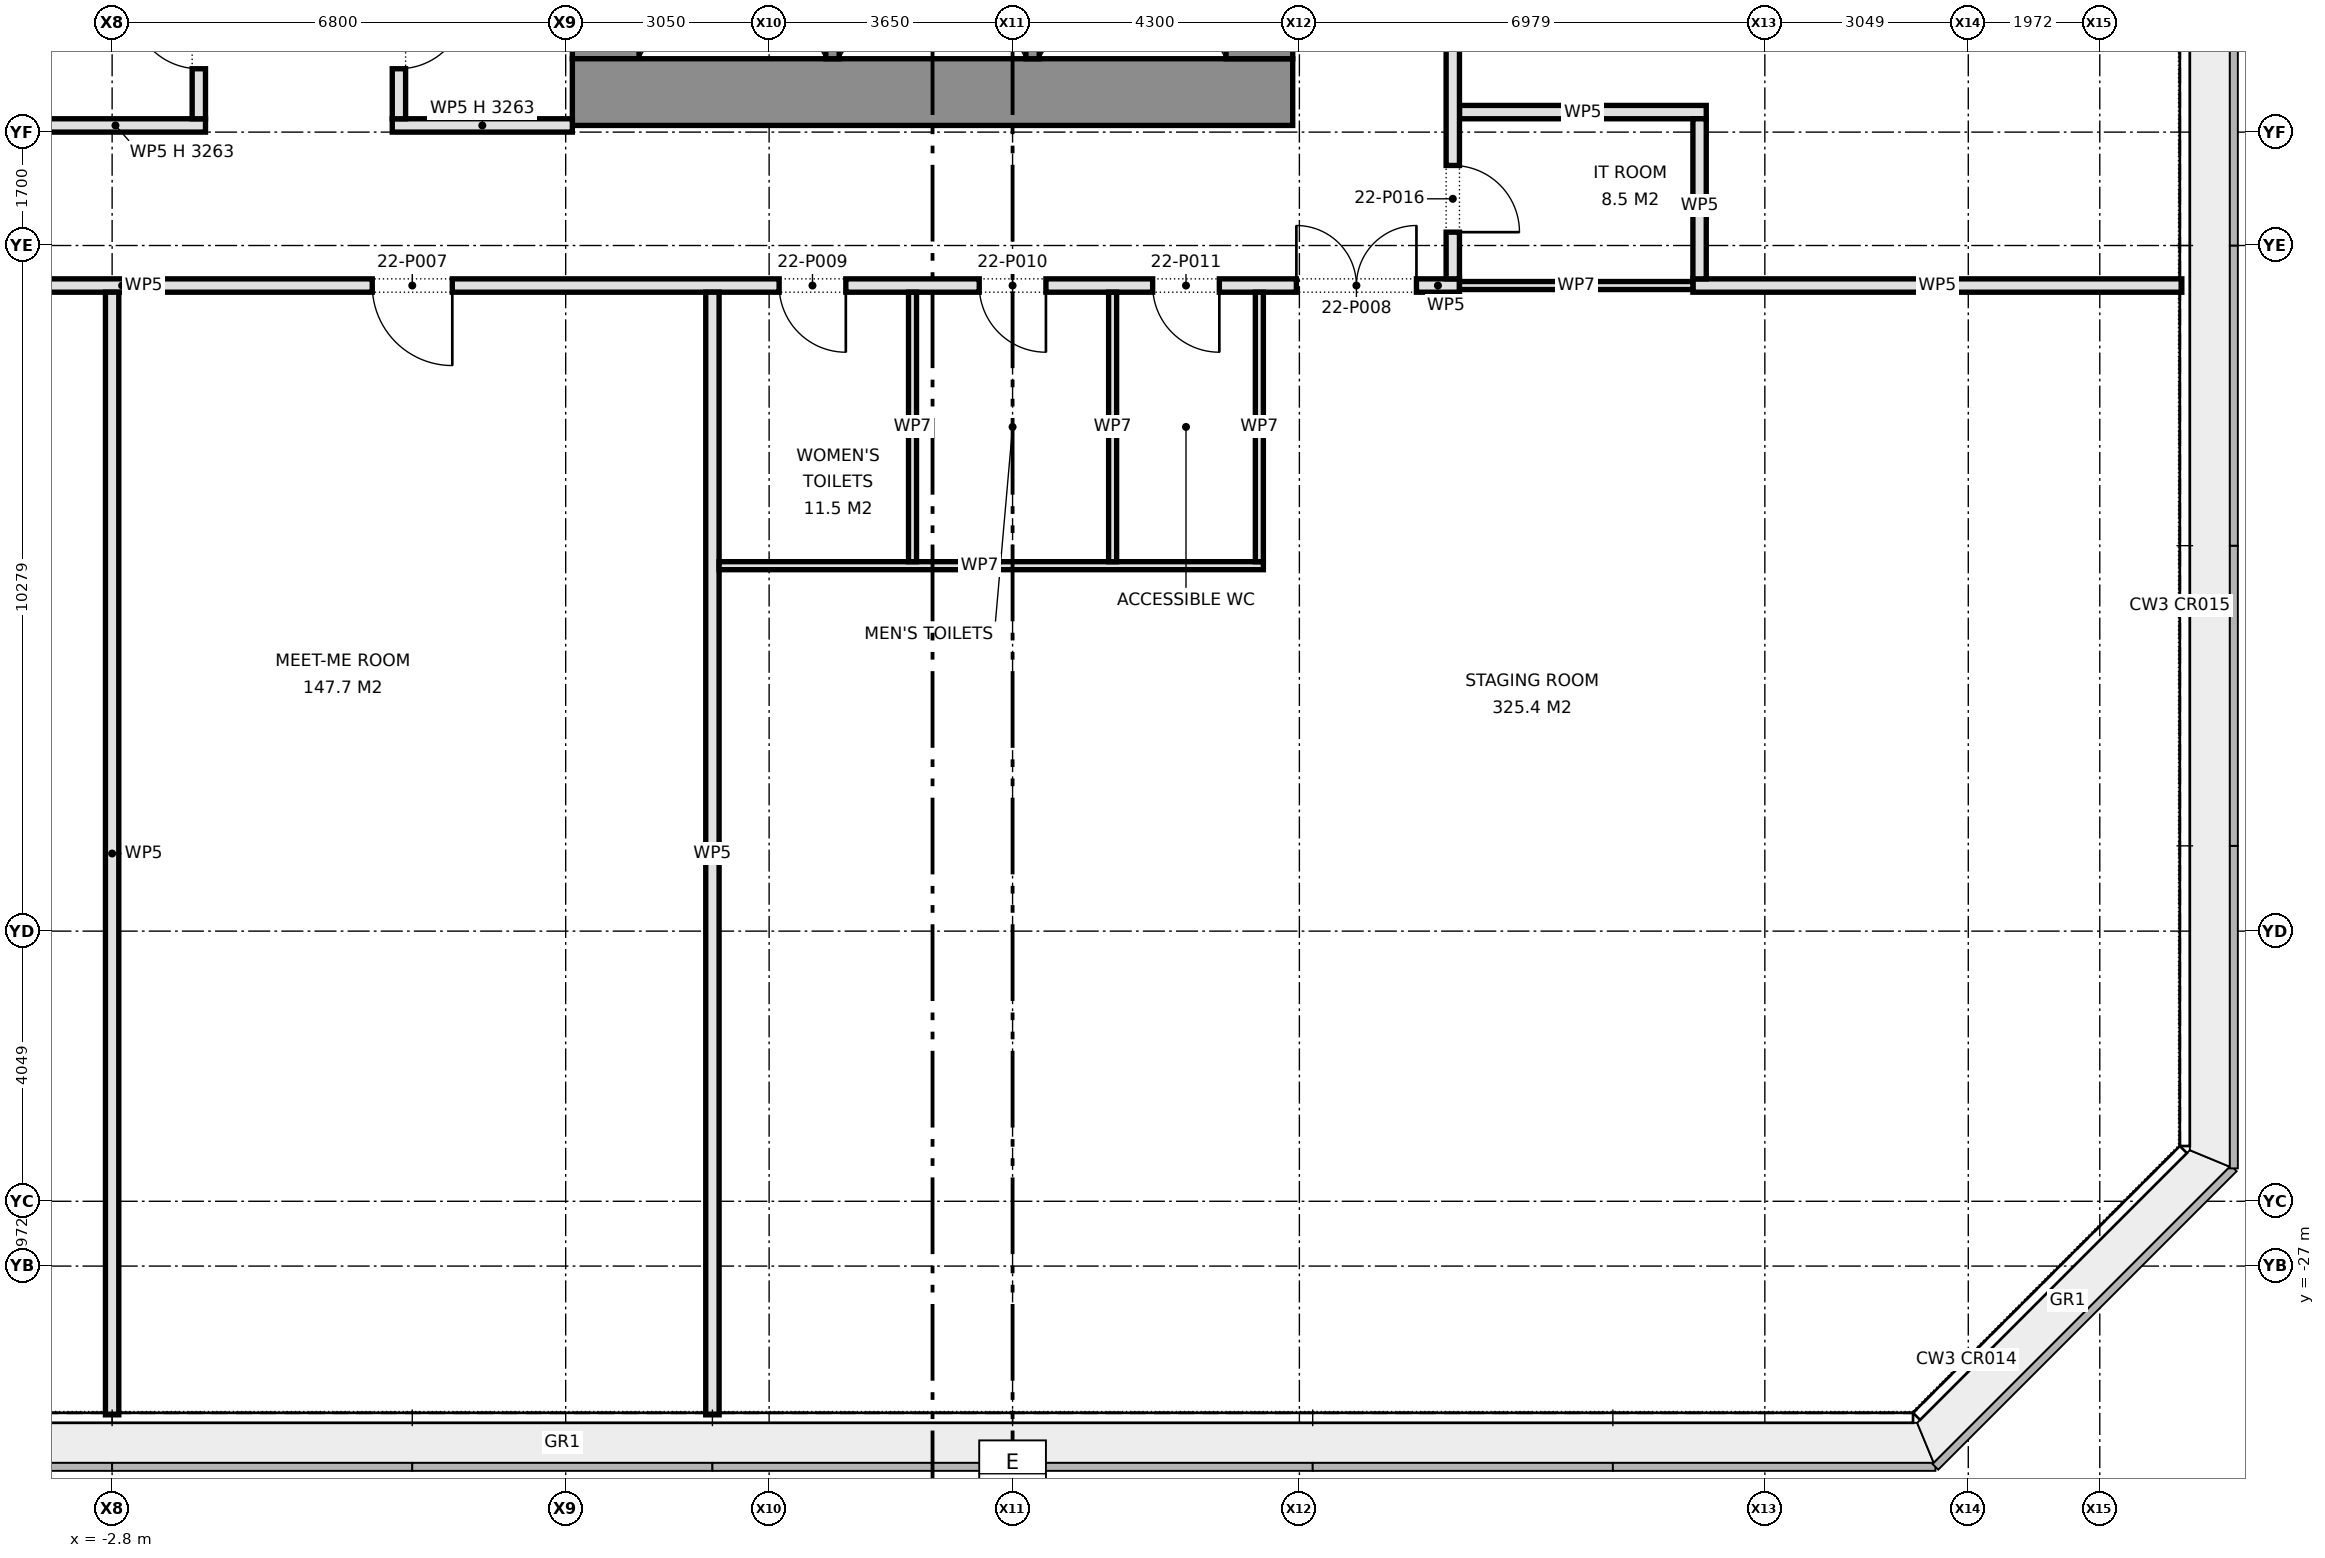
"""IFC4 building model, lengths in metres.
Left out: names, types, materials, properties, quantities, classifications, styles, units other than length and angle.
Written with IfcOpenShell. Run it as: python <this file> out.ifc"""

import sys

from ifc_helpers import new_model, si_unit, direction, frame, frame_2d, origin, place, context, subcontext, project, spatial, rectangle, extrude, element, fill, save


model = new_model("IFC4")
c1 = context("Model", 3, precision=1e-05, world=origin(), true_north=direction((0.0, 1.0)))
c2 = subcontext(c1, "Body", "Model", "MODEL_VIEW")
j1 = project(units=[si_unit("LENGTHUNIT", "METRE"), si_unit("PLANEANGLEUNIT", "RADIAN")], contexts=[c1])
p1 = place(None, origin())
s1 = spatial("IfcSite", under=j1, at=p1, CompositionType="ELEMENT")
p2 = place(p1, origin())
s2 = spatial("IfcBuilding", under=s1, at=p2, CompositionType="ELEMENT")
p3 = place(p2, frame((0.0, 0.0, 99.6)))
s3 = spatial("IfcBuildingStorey", under=s2, at=p3, CompositionType="ELEMENT", Elevation=99.6)
p4 = place(p3, frame((14.9, -9.4, 0.0), z_axis=(0.0, 0.0, 1.0), x_axis=(-1.0, 0.0, 0.0)))
e1 = element("IfcWall", 1, at=p4, inside=s3, PredefinedType="SHEAR", context=c2, shape_type="SweptSolid", body=[
    extrude(rectangle(XDim=10.8, YDim=1.0, at=frame_2d((5.4, 0.0))), origin(), (0.0, 0.0, 1.0), 4.2),
])
p5 = place(p3, frame((14.4, -3.68, 0.0), z_axis=(0.0, 0.0, 1.0), x_axis=(0.0, -1.0, 0.0)))
e2 = element("IfcWall", 2, at=p5, inside=s3, PredefinedType="SHEAR", context=c2, shape_type="SweptSolid", body=[
    extrude(rectangle(XDim=5.22, YDim=1.0, at=frame_2d((2.61, 0.0))), origin(), (0.0, 0.0, 1.0), 4.2),
])
p6 = place(p3, frame((4.6, -1.55, 0.0), z_axis=(0.0, 0.0, 1.0), x_axis=(0.0, -1.0, 0.0)))
e3 = element("IfcWall", 3, at=p6, inside=s3, PredefinedType="SHEAR", context=c2, shape_type="SweptSolid", body=[
    extrude(rectangle(XDim=7.35, YDim=1.0, at=frame_2d((3.675, 0.0))), origin(), (0.0, 0.0, 1.0), 4.2),
])
for number, where, z_axis, x_axis in (
    (4, (11.0, -2.38, 0.0), (0.0, 0.0, 1.0), (0.0, -1.0, 0.0)),
    (5, (8.0, -2.38, 0.0), (0.0, 0.0, 1.0), (0.0, -1.0, 0.0)),
):
    element("IfcWall", number, at=place(p3, frame(where, z_axis=z_axis, x_axis=x_axis)), inside=s3, PredefinedType="SHEAR", context=c2, shape_type="SweptSolid", body=[
        extrude(rectangle(XDim=6.52, YDim=0.2, at=frame_2d((3.26, 0.0))), origin(), (0.0, 0.0, 1.0), 4.2),
    ])
p7 = place(p3, frame((-20.33, -12.3, 0.0), z_axis=(0.0, 0.0, 1.0), x_axis=(1.0, 0.0, 0.0)))
e6 = element("IfcWall", 6, at=p7, inside=s3, PredefinedType="PARTITIONING", context=c2, shape_type="SweptSolid", body=[
    extrude(rectangle(XDim=37.73, YDim=0.2, at=frame_2d((18.865, 0.0))), origin(), (0.0, 0.0, 1.0), 4.2),
])
p8 = place(p7, frame((3.69, 0.0, 0.0)))
e7 = element("IfcOpeningElement", 7, at=p8, cuts=e6, PredefinedType="OPENING", context=c2, shape_type="SweptSolid", body=[
    extrude(rectangle(XDim=1.2, YDim=2.1, at=frame_2d((0.6, 1.05))), frame((0.0, 0.11, 0.0), z_axis=(0.0, -1.0, 0.0), x_axis=(1.0, 0.0, 0.0)), (0.0, 0.0, 1.0), 0.22),
])
p9 = place(p7, frame((12.13, 0.0, 0.0)))
e8 = element("IfcOpeningElement", 8, at=p9, cuts=e6, PredefinedType="OPENING", context=c2, shape_type="SweptSolid", body=[
    extrude(rectangle(XDim=1.8, YDim=2.1, at=frame_2d((0.9, 1.05))), frame((0.0, 0.11, 0.0), z_axis=(0.0, -1.0, 0.0), x_axis=(1.0, 0.0, 0.0)), (0.0, 0.0, 1.0), 0.22),
])
p10 = place(p7, frame((21.43, 0.0, 0.0)))
e9 = element("IfcOpeningElement", 9, at=p10, cuts=e6, PredefinedType="OPENING", context=c2, shape_type="SweptSolid", body=[
    extrude(rectangle(XDim=1.2, YDim=2.1, at=frame_2d((0.6, 1.05))), frame((0.0, 0.11, 0.0), z_axis=(0.0, -1.0, 0.0), x_axis=(1.0, 0.0, 0.0)), (0.0, 0.0, 1.0), 0.22),
])
p11 = place(p7, frame((35.285, 0.0, 0.0)))
e10 = element("IfcOpeningElement", 10, at=p11, cuts=e6, PredefinedType="OPENING", context=c2, shape_type="SweptSolid", body=[
    extrude(rectangle(XDim=1.8, YDim=2.1, at=frame_2d((0.9, 1.05))), frame((0.0, 0.11, 0.0), z_axis=(0.0, -1.0, 0.0), x_axis=(1.0, 0.0, 0.0)), (0.0, 0.0, 1.0), 0.22),
])
p12 = place(p7, frame((27.53, 0.0, 0.0)))
e11 = element("IfcOpeningElement", 11, at=p12, cuts=e6, PredefinedType="OPENING", context=c2, shape_type="SweptSolid", body=[
    extrude(rectangle(XDim=1.0, YDim=2.1, at=frame_2d((0.5, 1.05))), frame((0.0, 0.11, 0.0), z_axis=(0.0, -1.0, 0.0), x_axis=(1.0, 0.0, 0.0)), (0.0, 0.0, 1.0), 0.22),
])
p13 = place(p7, frame((30.53, 0.0, 0.0)))
e12 = element("IfcOpeningElement", 12, at=p13, cuts=e6, PredefinedType="OPENING", context=c2, shape_type="SweptSolid", body=[
    extrude(rectangle(XDim=1.0, YDim=2.1, at=frame_2d((0.5, 1.05))), frame((0.0, 0.11, 0.0), z_axis=(0.0, -1.0, 0.0), x_axis=(1.0, 0.0, 0.0)), (0.0, 0.0, 1.0), 0.22),
])
p14 = place(p7, frame((33.13, 0.0, 0.0)))
e13 = element("IfcOpeningElement", 13, at=p14, cuts=e6, PredefinedType="OPENING", context=c2, shape_type="SweptSolid", body=[
    extrude(rectangle(XDim=1.0, YDim=2.1, at=frame_2d((0.5, 1.05))), frame((0.0, 0.11, 0.0), z_axis=(0.0, -1.0, 0.0), x_axis=(1.0, 0.0, 0.0)), (0.0, 0.0, 1.0), 0.22),
])
p15 = place(p3, frame((20.9, -12.3, 0.0), z_axis=(0.0, 0.0, 1.0), x_axis=(1.0, 0.0, 0.0)))
e14 = element("IfcWall", 14, at=p15, inside=s3, PredefinedType="PARTITIONING", context=c2, shape_type="SweptSolid", body=[
    extrude(rectangle(XDim=7.33, YDim=0.2, at=frame_2d((3.665, 0.0))), origin(), (0.0, 0.0, 1.0), 4.2),
])
for number, where, z_axis, x_axis in (
    (15, (-4.1, -9.9, 0.0), (0.0, 0.0, 1.0), (1.0, 0.0, 0.0)),
    (16, (1.4, -9.9, 0.0), (0.0, 0.0, 1.0), (1.0, 0.0, 0.0)),
):
    element("IfcWall", number, at=place(p3, frame(where, z_axis=z_axis, x_axis=x_axis)), inside=s3, PredefinedType="PARTITIONING", context=c2, shape_type="SweptSolid", body=[
        extrude(rectangle(XDim=2.7, YDim=0.2, at=frame_2d((1.35, 0.0))), origin(), (0.0, 0.0, 1.0), 3.263),
    ])
p16 = place(p3, frame((17.4, -9.7, 0.0), z_axis=(0.0, 0.0, 1.0), x_axis=(1.0, 0.0, 0.0)))
e17 = element("IfcWall", 17, at=p16, inside=s3, PredefinedType="PARTITIONING", context=c2, shape_type="SweptSolid", body=[
    extrude(rectangle(XDim=3.7, YDim=0.2, at=frame_2d((1.85, 0.0))), origin(), (0.0, 0.0, 1.0), 4.2),
])
p17 = place(p3, frame((21.0, -12.2, 0.0), z_axis=(0.0, 0.0, 1.0), x_axis=(0.0, 1.0, 0.0)))
e18 = element("IfcWall", 18, at=p17, inside=s3, PredefinedType="PARTITIONING", context=c2, shape_type="SweptSolid", body=[
    extrude(rectangle(XDim=2.4, YDim=0.2, at=frame_2d((1.2, 0.0))), origin(), (0.0, 0.0, 1.0), 4.2),
])
p18 = place(p3, frame((17.3, -12.2, 0.0), z_axis=(0.0, 0.0, 1.0), x_axis=(0.0, 1.0, 0.0)))
e19 = element("IfcWall", 19, at=p18, inside=s3, PredefinedType="PARTITIONING", context=c2, shape_type="SweptSolid", body=[
    extrude(rectangle(XDim=24.4, YDim=0.2, at=frame_2d((12.2, 0.0))), origin(), (0.0, 0.0, 1.0), 4.2),
])
p19 = place(p18, frame((11.85, 0.0, 0.0)))
e20 = element("IfcOpeningElement", 20, at=p19, cuts=e19, PredefinedType="OPENING", context=c2, shape_type="SweptSolid", body=[
    extrude(rectangle(XDim=1.8, YDim=2.1, at=frame_2d((0.9, 1.05))), frame((0.0, 0.11, 0.0), z_axis=(0.0, -1.0, 0.0), x_axis=(1.0, 0.0, 0.0)), (0.0, 0.0, 1.0), 0.22),
])
p20 = place(p18, frame((0.7, 0.0, 0.0)))
e21 = element("IfcOpeningElement", 21, at=p20, cuts=e19, PredefinedType="OPENING", context=c2, shape_type="SweptSolid", body=[
    extrude(rectangle(XDim=1.0, YDim=2.1, at=frame_2d((0.5, 1.05))), frame((0.0, 0.11, 0.0), z_axis=(0.0, -1.0, 0.0), x_axis=(1.0, 0.0, 0.0)), (0.0, 0.0, 1.0), 0.22),
])
p21 = place(p3, frame((6.2, -29.23, 0.0), z_axis=(0.0, 0.0, 1.0), x_axis=(0.0, 1.0, 0.0)))
e22 = element("IfcWall", 22, at=p21, inside=s3, PredefinedType="PARTITIONING", context=c2, shape_type="SweptSolid", body=[
    extrude(rectangle(XDim=16.83, YDim=0.2, at=frame_2d((8.415, 0.0))), origin(), (0.0, 0.0, 1.0), 4.2),
])
p22 = place(p3, frame((1.5, -9.8, 0.0), z_axis=(0.0, 0.0, 1.0), x_axis=(0.0, 1.0, 0.0)))
e23 = element("IfcWall", 23, at=p22, inside=s3, PredefinedType="PARTITIONING", context=c2, shape_type="SweptSolid", body=[
    extrude(rectangle(XDim=2.5, YDim=0.2, at=frame_2d((1.25, 0.0))), origin(), (0.0, 0.0, 1.0), 4.2),
])
p23 = place(p22, frame((0.75, 0.0, 0.0)))
e24 = element("IfcOpeningElement", 24, at=p23, cuts=e23, PredefinedType="OPENING", context=c2, shape_type="SweptSolid", body=[
    extrude(rectangle(XDim=1.0, YDim=2.1, at=frame_2d((0.5, 1.05))), frame((0.0, 0.11, 0.0), z_axis=(0.0, -1.0, 0.0), x_axis=(1.0, 0.0, 0.0)), (0.0, 0.0, 1.0), 0.22),
])
p24 = place(p3, frame((-1.5, -9.8, 0.0), z_axis=(0.0, 0.0, 1.0), x_axis=(0.0, 1.0, 0.0)))
e25 = element("IfcWall", 25, at=p24, inside=s3, PredefinedType="PARTITIONING", context=c2, shape_type="SweptSolid", body=[
    extrude(rectangle(XDim=2.5, YDim=0.2, at=frame_2d((1.25, 0.0))), origin(), (0.0, 0.0, 1.0), 4.2),
])
p25 = place(p24, frame((0.75, 0.0, 0.0)))
e26 = element("IfcOpeningElement", 26, at=p25, cuts=e25, PredefinedType="OPENING", context=c2, shape_type="SweptSolid", body=[
    extrude(rectangle(XDim=1.0, YDim=2.1, at=frame_2d((0.5, 1.05))), frame((0.0, 0.11, 0.0), z_axis=(0.0, -1.0, 0.0), x_axis=(1.0, 0.0, 0.0)), (0.0, 0.0, 1.0), 0.22),
])
p26 = place(p3, frame((-2.8, -29.23, 0.0), z_axis=(0.0, 0.0, 1.0), x_axis=(0.0, 1.0, 0.0)))
e27 = element("IfcWall", 27, at=p26, inside=s3, PredefinedType="PARTITIONING", context=c2, shape_type="SweptSolid", body=[
    extrude(rectangle(XDim=16.83, YDim=0.2, at=frame_2d((8.415, 0.0))), origin(), (0.0, 0.0, 1.0), 4.2),
])
p27 = place(p3, frame((6.3, -16.5, 0.0), z_axis=(0.0, 0.0, 1.0), x_axis=(1.0, 0.0, 0.0)))
e28 = element("IfcWall", 28, at=p27, inside=s3, PredefinedType="PARTITIONING", context=c2, shape_type="SweptSolid", body=[
    extrude(rectangle(XDim=8.16, YDim=0.12, at=frame_2d((4.08, 0.0))), origin(), (0.0, 0.0, 1.0), 4.2),
])
p28 = place(p3, frame((17.4, -12.3, 0.0), z_axis=(0.0, 0.0, 1.0), x_axis=(1.0, 0.0, 0.0)))
e29 = element("IfcWall", 29, at=p28, inside=s3, PredefinedType="PARTITIONING", context=c2, shape_type="SweptSolid", body=[
    extrude(rectangle(XDim=3.5, YDim=0.12, at=frame_2d((1.75, 0.0))), origin(), (0.0, 0.0, 1.0), 4.2),
])
for number, where, z_axis, x_axis in (
    (30, (14.4, -16.44, 0.0), (0.0, 0.0, 1.0), (0.0, 1.0, 0.0)),
    (31, (12.2, -16.44, 0.0), (0.0, 0.0, 1.0), (0.0, 1.0, 0.0)),
    (32, (9.2, -16.44, 0.0), (0.0, 0.0, 1.0), (0.0, 1.0, 0.0)),
):
    element("IfcWall", number, at=place(p3, frame(where, z_axis=z_axis, x_axis=x_axis)), inside=s3, PredefinedType="PARTITIONING", context=c2, shape_type="SweptSolid", body=[
        extrude(rectangle(XDim=4.04, YDim=0.12, at=frame_2d((2.02, 0.0))), origin(), (0.0, 0.0, 1.0), 4.2),
    ])
p29 = place(p25, origin())
e33 = element("IfcDoor", 33, at=p29, inside=s3, OperationType="SINGLE_SWING_RIGHT", PredefinedType="DOOR", context=c2, shape_type="SweptSolid", body=[
    extrude(rectangle(XDim=1.0, YDim=2.1, at=frame_2d((0.5, 1.05))), frame((0.0, 0.025, 0.0), z_axis=(0.0, -1.0, 0.0), x_axis=(1.0, 0.0, 0.0)), (0.0, 0.0, 1.0), 0.05),
])
fill(e26, e33)
p30 = place(p23, frame((1.0, 0.0, 0.0), z_axis=(0.0, 0.0, 1.0), x_axis=(-1.0, 0.0, 0.0)))
e34 = element("IfcDoor", 34, at=p30, inside=s3, OperationType="SINGLE_SWING_LEFT", PredefinedType="DOOR", context=c2, shape_type="SweptSolid", body=[
    extrude(rectangle(XDim=1.0, YDim=2.1, at=frame_2d((0.5, 1.05))), frame((0.0, 0.025, 0.0), z_axis=(0.0, -1.0, 0.0), x_axis=(1.0, 0.0, 0.0)), (0.0, 0.0, 1.0), 0.05),
])
fill(e24, e34)
p31 = place(p10, frame((1.2, 0.0, 0.0), z_axis=(0.0, 0.0, 1.0), x_axis=(-1.0, 0.0, 0.0)))
e35 = element("IfcDoor", 35, at=p31, inside=s3, OperationType="SINGLE_SWING_LEFT", PredefinedType="DOOR", context=c2, shape_type="SweptSolid", body=[
    extrude(rectangle(XDim=1.2, YDim=2.1, at=frame_2d((0.6, 1.05))), frame((0.0, 0.025, 0.0), z_axis=(0.0, -1.0, 0.0), x_axis=(1.0, 0.0, 0.0)), (0.0, 0.0, 1.0), 0.05),
])
fill(e9, e35)
p32 = place(p11, origin())
e36 = element("IfcDoor", 36, at=p32, inside=s3, OperationType="DOUBLE_DOOR_SINGLE_SWING", PredefinedType="DOOR", context=c2, shape_type="SweptSolid", body=[
    extrude(rectangle(XDim=1.8, YDim=2.1, at=frame_2d((0.9, 1.05))), frame((0.0, 0.025, 0.0), z_axis=(0.0, -1.0, 0.0), x_axis=(1.0, 0.0, 0.0)), (0.0, 0.0, 1.0), 0.05),
])
fill(e10, e36)
p33 = place(p12, frame((1.0, 0.0, 0.0), z_axis=(0.0, 0.0, 1.0), x_axis=(-1.0, 0.0, 0.0)))
e37 = element("IfcDoor", 37, at=p33, inside=s3, OperationType="SINGLE_SWING_LEFT", PredefinedType="DOOR", context=c2, shape_type="SweptSolid", body=[
    extrude(rectangle(XDim=1.0, YDim=2.1, at=frame_2d((0.5, 1.05))), frame((0.0, 0.025, 0.0), z_axis=(0.0, -1.0, 0.0), x_axis=(1.0, 0.0, 0.0)), (0.0, 0.0, 1.0), 0.05),
])
fill(e11, e37)
p34 = place(p13, frame((1.0, 0.0, 0.0), z_axis=(0.0, 0.0, 1.0), x_axis=(-1.0, 0.0, 0.0)))
e38 = element("IfcDoor", 38, at=p34, inside=s3, OperationType="SINGLE_SWING_LEFT", PredefinedType="DOOR", context=c2, shape_type="SweptSolid", body=[
    extrude(rectangle(XDim=1.0, YDim=2.1, at=frame_2d((0.5, 1.05))), frame((0.0, 0.025, 0.0), z_axis=(0.0, -1.0, 0.0), x_axis=(1.0, 0.0, 0.0)), (0.0, 0.0, 1.0), 0.05),
])
fill(e12, e38)
p35 = place(p14, frame((1.0, 0.0, 0.0), z_axis=(0.0, 0.0, 1.0), x_axis=(-1.0, 0.0, 0.0)))
e39 = element("IfcDoor", 39, at=p35, inside=s3, OperationType="SINGLE_SWING_LEFT", PredefinedType="DOOR", context=c2, shape_type="SweptSolid", body=[
    extrude(rectangle(XDim=1.0, YDim=2.1, at=frame_2d((0.5, 1.05))), frame((0.0, 0.025, 0.0), z_axis=(0.0, -1.0, 0.0), x_axis=(1.0, 0.0, 0.0)), (0.0, 0.0, 1.0), 0.05),
])
fill(e13, e39)
p36 = place(p20, frame((1.0, 0.0, 0.0), z_axis=(0.0, 0.0, 1.0), x_axis=(-1.0, 0.0, 0.0)))
e40 = element("IfcDoor", 40, at=p36, inside=s3, OperationType="SINGLE_SWING_RIGHT", PredefinedType="DOOR", context=c2, shape_type="SweptSolid", body=[
    extrude(rectangle(XDim=1.0, YDim=2.1, at=frame_2d((0.5, 1.05))), frame((0.0, 0.025, 0.0), z_axis=(0.0, -1.0, 0.0), x_axis=(1.0, 0.0, 0.0)), (0.0, 0.0, 1.0), 0.05),
])
fill(e21, e40)
save(model, sys.argv[1])
